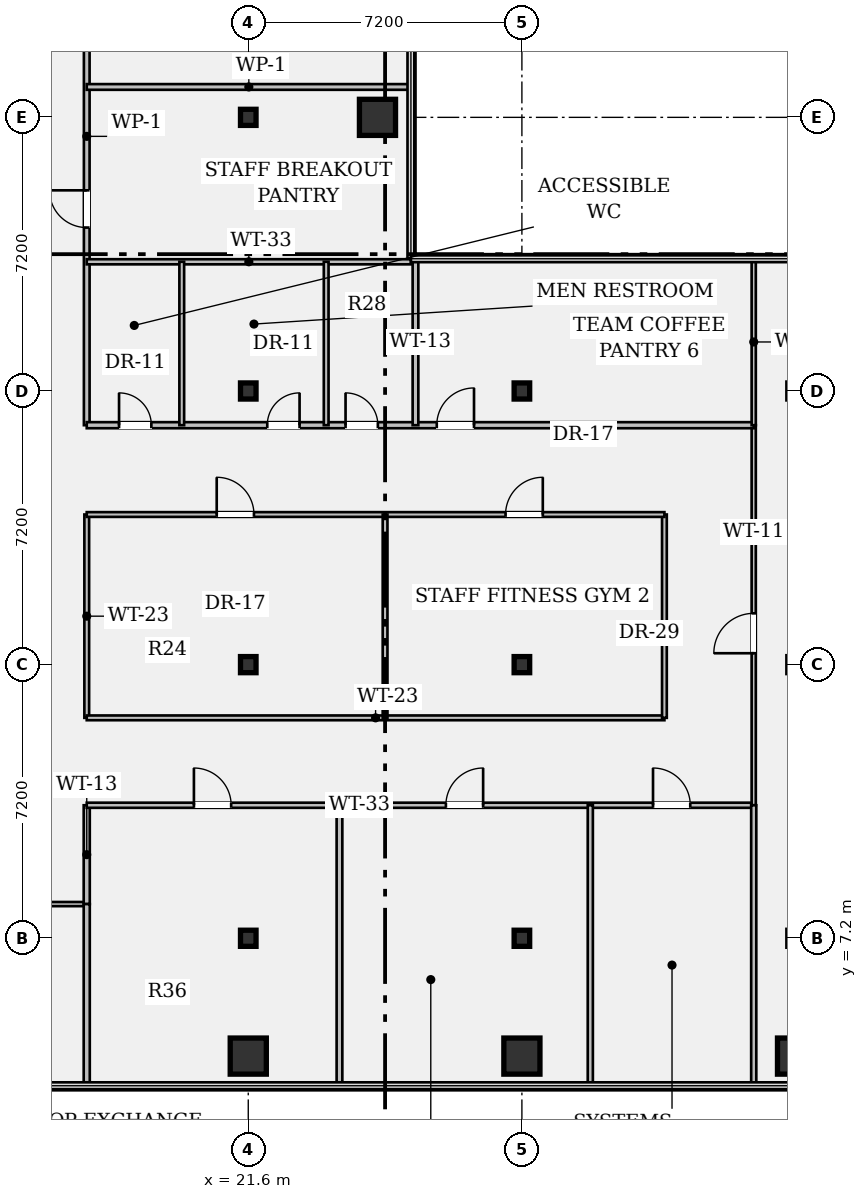
"""IFC4 building model, lengths in metres.
Left out: names, types, materials, properties, quantities, classifications, styles, units other than length and angle.
Written with IfcOpenShell. Run it as: python <this file> out.ifc"""

import sys

from ifc_helpers import new_model, si_unit, direction, frame, frame_2d, origin, origin_2d, place, context, subcontext, project, spatial, rectangle, hollow_rectangle, i_section, extrude, element, fill, save


model = new_model("IFC4")
c1 = context("Model", 3, precision=1e-05, world=origin(), true_north=direction((0.0, 1.0)))
c2 = subcontext(c1, "Body", "Model", "MODEL_VIEW")
j1 = project(units=[si_unit("LENGTHUNIT", "METRE"), si_unit("PLANEANGLEUNIT", "RADIAN")], contexts=[c1])
p1 = place(None, origin())
s1 = spatial("IfcSite", under=j1, at=p1, CompositionType="ELEMENT")
p2 = place(p1, origin())
s2 = spatial("IfcBuilding", under=s1, at=p2, CompositionType="ELEMENT")
p3 = place(p2, frame((0.0, 0.0, 113.75)))
s3 = spatial("IfcBuildingStorey", under=s2, at=p3, CompositionType="ELEMENT", Elevation=113.75)
p4 = place(p3, frame((21.6, 4.1, 0.0), z_axis=(0.0, 0.0, 1.0), x_axis=(1.0, 0.0, 0.0)))
e1 = element("IfcColumn", 1, at=p4, inside=s3, PredefinedType="COLUMN", context=c2, shape_type="SweptSolid", body=[
    extrude(hollow_rectangle(XDim=0.95, YDim=0.95, WallThickness=0.06, at=origin_2d()), origin(), (0.0, 0.0, 1.0), 3.58),
])
for number, where, z_axis, x_axis in (
    (2, (21.6, 7.2, 0.0), (0.0, 0.0, 1.0), (1.0, 0.0, 0.0)),
    (3, (21.6, 14.4, 0.0), (0.0, 0.0, 1.0), (1.0, 0.0, 0.0)),
    (4, (21.6, 21.6, 0.0), (0.0, 0.0, 1.0), (1.0, 0.0, 0.0)),
    (5, (21.6, 28.8, 0.0), (0.0, 0.0, 1.0), (1.0, 0.0, 0.0)),
):
    element("IfcColumn", number, at=place(p3, frame(where, z_axis=z_axis, x_axis=x_axis)), inside=s3, PredefinedType="COLUMN", context=c2, shape_type="SweptSolid", body=[
        extrude(i_section(OverallWidth=0.409, OverallDepth=0.424, WebThickness=0.033, FlangeThickness=0.052, FilletRadius=0.018, at=origin_2d()), origin(), (0.0, 0.0, 1.0), 3.58),
    ])
for number, where, z_axis, x_axis in (
    (6, (25.0, 28.8, 0.0), (0.0, 0.0, 1.0), (1.0, 0.0, 0.0)),
    (7, (28.8, 4.1, 0.0), (0.0, 0.0, 1.0), (1.0, 0.0, 0.0)),
):
    element("IfcColumn", number, at=place(p3, frame(where, z_axis=z_axis, x_axis=x_axis)), inside=s3, PredefinedType="COLUMN", context=c2, shape_type="SweptSolid", body=[
        extrude(hollow_rectangle(XDim=0.95, YDim=0.95, WallThickness=0.06, at=origin_2d()), origin(), (0.0, 0.0, 1.0), 3.58),
    ])
for number, where, z_axis, x_axis in (
    (8, (28.8, 7.2, 0.0), (0.0, 0.0, 1.0), (1.0, 0.0, 0.0)),
    (9, (28.8, 14.4, 0.0), (0.0, 0.0, 1.0), (1.0, 0.0, 0.0)),
    (10, (28.8, 21.6, 0.0), (0.0, 0.0, 1.0), (1.0, 0.0, 0.0)),
):
    element("IfcColumn", number, at=place(p3, frame(where, z_axis=z_axis, x_axis=x_axis)), inside=s3, PredefinedType="COLUMN", context=c2, shape_type="SweptSolid", body=[
        extrude(i_section(OverallWidth=0.409, OverallDepth=0.424, WebThickness=0.033, FlangeThickness=0.052, FilletRadius=0.018, at=origin_2d()), origin(), (0.0, 0.0, 1.0), 3.58),
    ])
p5 = place(p3, frame((36.0, 4.1, 0.0), z_axis=(0.0, 0.0, 1.0), x_axis=(1.0, 0.0, 0.0)))
e11 = element("IfcColumn", 11, at=p5, inside=s3, PredefinedType="COLUMN", context=c2, shape_type="SweptSolid", body=[
    extrude(hollow_rectangle(XDim=0.95, YDim=0.95, WallThickness=0.06, at=origin_2d()), origin(), (0.0, 0.0, 1.0), 3.58),
])
for number, where, z_axis, x_axis in (
    (12, (36.0, 7.2, 0.0), (0.0, 0.0, 1.0), (1.0, 0.0, 0.0)),
    (13, (36.0, 14.4, 0.0), (0.0, 0.0, 1.0), (1.0, 0.0, 0.0)),
    (14, (36.0, 21.6, 0.0), (0.0, 0.0, 1.0), (1.0, 0.0, 0.0)),
):
    element("IfcColumn", number, at=place(p3, frame(where, z_axis=z_axis, x_axis=x_axis)), inside=s3, PredefinedType="COLUMN", context=c2, shape_type="SweptSolid", body=[
        extrude(i_section(OverallWidth=0.409, OverallDepth=0.424, WebThickness=0.033, FlangeThickness=0.052, FilletRadius=0.018, at=origin_2d()), origin(), (0.0, 0.0, 1.0), 3.58),
    ])
p6 = place(p3, frame((14.4, 8.1, 0.0), z_axis=(0.0, 0.0, 1.0), x_axis=(1.0, 0.0, 0.0)))
e15 = element("IfcWall", 15, at=p6, inside=s3, PredefinedType="PARTITIONING", context=c2, shape_type="SweptSolid", body=[
    extrude(rectangle(XDim=2.95, YDim=0.11, at=frame_2d((1.475, 0.0))), origin(), (0.0, 0.0, 1.0), 3.098),
])
p7 = place(p6, frame((0.95, 0.0, 0.0)))
e16 = element("IfcOpeningElement", 16, at=p7, cuts=e15, PredefinedType="OPENING", context=c2, shape_type="SweptSolid", body=[
    extrude(rectangle(XDim=0.98, YDim=2.15, at=frame_2d((0.49, 1.075))), frame((0.0, 0.067, 0.0), z_axis=(0.0, -1.0, 0.0), x_axis=(1.0, 0.0, 0.0)), (0.0, 0.0, 1.0), 0.134),
])
p8 = place(p3, frame((17.35, 8.1, 0.0), z_axis=(0.0, 0.0, 1.0), x_axis=(0.0, 1.0, 0.0)))
e17 = element("IfcWall", 17, at=p8, inside=s3, PredefinedType="PARTITIONING", context=c2, shape_type="SweptSolid", body=[
    extrude(rectangle(XDim=2.6, YDim=0.16, at=frame_2d((1.3, 0.0))), origin(), (0.0, 0.0, 1.0), 3.58),
])
p9 = place(p3, frame((17.35, 20.7, 0.0), z_axis=(0.0, 0.0, 1.0), x_axis=(0.0, 1.0, 0.0)))
e18 = element("IfcWall", 18, at=p9, inside=s3, PredefinedType="PARTITIONING", context=c2, shape_type="SweptSolid", body=[
    extrude(rectangle(XDim=15.2, YDim=0.15, at=frame_2d((7.6, 0.0))), origin(), (0.0, 0.0, 1.0), 2.869),
])
p10 = place(p9, frame((5.2, 0.0, 0.0)))
e19 = element("IfcOpeningElement", 19, at=p10, cuts=e18, PredefinedType="OPENING", context=c2, shape_type="SweptSolid", body=[
    extrude(rectangle(XDim=0.98, YDim=2.15, at=frame_2d((0.49, 1.075))), frame((0.0, 0.087, 0.0), z_axis=(0.0, -1.0, 0.0), x_axis=(1.0, 0.0, 0.0)), (0.0, 0.0, 1.0), 0.174),
])
p11 = place(p9, frame((10.6, 0.0, 0.0)))
e20 = element("IfcOpeningElement", 20, at=p11, cuts=e18, PredefinedType="OPENING", context=c2, shape_type="SweptSolid", body=[
    extrude(rectangle(XDim=1.0, YDim=2.15, at=frame_2d((0.5, 1.075))), frame((0.0, 0.087, 0.0), z_axis=(0.0, -1.0, 0.0), x_axis=(1.0, 0.0, 0.0)), (0.0, 0.0, 1.0), 0.174),
])
p12 = place(p3, frame((17.35, 10.7, 0.0), z_axis=(0.0, 0.0, 1.0), x_axis=(1.0, 0.0, 0.0)))
e21 = element("IfcWall", 21, at=p12, inside=s3, PredefinedType="PARTITIONING", context=c2, shape_type="SweptSolid", body=[
    extrude(rectangle(XDim=17.55, YDim=0.135, at=frame_2d((8.775, 0.0))), origin(), (0.0, 0.0, 1.0), 2.869),
])
p13 = place(p12, frame((2.82, 0.0, 0.0)))
e22 = element("IfcOpeningElement", 22, at=p13, cuts=e21, PredefinedType="OPENING", context=c2, shape_type="SweptSolid", body=[
    extrude(rectangle(XDim=0.98, YDim=2.15, at=frame_2d((0.49, 1.075))), frame((0.0, 0.08, 0.0), z_axis=(0.0, -1.0, 0.0), x_axis=(1.0, 0.0, 0.0)), (0.0, 0.0, 1.0), 0.159),
])
p14 = place(p12, frame((9.45, 0.0, 0.0)))
e23 = element("IfcOpeningElement", 23, at=p14, cuts=e21, PredefinedType="OPENING", context=c2, shape_type="SweptSolid", body=[
    extrude(rectangle(XDim=0.98, YDim=2.15, at=frame_2d((0.49, 1.075))), frame((0.0, 0.08, 0.0), z_axis=(0.0, -1.0, 0.0), x_axis=(1.0, 0.0, 0.0)), (0.0, 0.0, 1.0), 0.159),
])
p15 = place(p12, frame((14.9, 0.0, 0.0)))
e24 = element("IfcOpeningElement", 24, at=p15, cuts=e21, PredefinedType="OPENING", context=c2, shape_type="SweptSolid", body=[
    extrude(rectangle(XDim=0.98, YDim=2.15, at=frame_2d((0.49, 1.075))), frame((0.0, 0.08, 0.0), z_axis=(0.0, -1.0, 0.0), x_axis=(1.0, 0.0, 0.0)), (0.0, 0.0, 1.0), 0.159),
])
p16 = place(p3, frame((34.9, 10.7, 0.0), z_axis=(0.0, 0.0, 1.0), x_axis=(0.0, 1.0, 0.0)))
e25 = element("IfcWall", 25, at=p16, inside=s3, PredefinedType="PARTITIONING", context=c2, shape_type="SweptSolid", body=[
    extrude(rectangle(XDim=10.0, YDim=0.11, at=frame_2d((5.0, 0.0))), origin(), (0.0, 0.0, 1.0), 2.869),
])
p17 = place(p16, frame((4.0, 0.0, 0.0)))
e26 = element("IfcOpeningElement", 26, at=p17, cuts=e25, PredefinedType="OPENING", context=c2, shape_type="SweptSolid", body=[
    extrude(rectangle(XDim=1.05, YDim=2.15, at=frame_2d((0.525, 1.075))), frame((0.0, 0.067, 0.0), z_axis=(0.0, -1.0, 0.0), x_axis=(1.0, 0.0, 0.0)), (0.0, 0.0, 1.0), 0.134),
])
p18 = place(p3, frame((17.35, 20.7, 0.0), z_axis=(0.0, 0.0, 1.0), x_axis=(1.0, 0.0, 0.0)))
e27 = element("IfcWall", 27, at=p18, inside=s3, PredefinedType="PARTITIONING", context=c2, shape_type="SweptSolid", body=[
    extrude(rectangle(XDim=17.55, YDim=0.16, at=frame_2d((8.775, 0.0))), origin(), (0.0, 0.0, 1.0), 2.869),
])
p19 = place(p18, frame((0.85, 0.0, 0.0)))
e28 = element("IfcOpeningElement", 28, at=p19, cuts=e27, PredefinedType="OPENING", context=c2, shape_type="SweptSolid", body=[
    extrude(rectangle(XDim=0.85, YDim=2.15, at=frame_2d((0.425, 1.075))), frame((0.0, 0.092, 0.0), z_axis=(0.0, -1.0, 0.0), x_axis=(1.0, 0.0, 0.0)), (0.0, 0.0, 1.0), 0.184),
])
p20 = place(p18, frame((4.75, 0.0, 0.0)))
e29 = element("IfcOpeningElement", 29, at=p20, cuts=e27, PredefinedType="OPENING", context=c2, shape_type="SweptSolid", body=[
    extrude(rectangle(XDim=0.85, YDim=2.15, at=frame_2d((0.425, 1.075))), frame((0.0, 0.092, 0.0), z_axis=(0.0, -1.0, 0.0), x_axis=(1.0, 0.0, 0.0)), (0.0, 0.0, 1.0), 0.184),
])
p21 = place(p18, frame((6.81, 0.0, 0.0)))
e30 = element("IfcOpeningElement", 30, at=p21, cuts=e27, PredefinedType="OPENING", context=c2, shape_type="SweptSolid", body=[
    extrude(rectangle(XDim=0.85, YDim=2.15, at=frame_2d((0.425, 1.075))), frame((0.0, 0.092, 0.0), z_axis=(0.0, -1.0, 0.0), x_axis=(1.0, 0.0, 0.0)), (0.0, 0.0, 1.0), 0.184),
])
p22 = place(p18, frame((9.21, 0.0, 0.0)))
e31 = element("IfcOpeningElement", 31, at=p22, cuts=e27, PredefinedType="OPENING", context=c2, shape_type="SweptSolid", body=[
    extrude(rectangle(XDim=0.98, YDim=2.15, at=frame_2d((0.49, 1.075))), frame((0.0, 0.092, 0.0), z_axis=(0.0, -1.0, 0.0), x_axis=(1.0, 0.0, 0.0)), (0.0, 0.0, 1.0), 0.184),
])
p23 = place(p3, frame((17.35, 13.0, 0.0), z_axis=(0.0, 0.0, 1.0), x_axis=(0.0, 1.0, 0.0)))
e32 = element("IfcWall", 32, at=p23, inside=s3, PredefinedType="PARTITIONING", context=c2, shape_type="SweptSolid", body=[
    extrude(rectangle(XDim=5.35, YDim=0.125, at=frame_2d((2.675, 0.0))), origin(), (0.0, 0.0, 1.0), 2.869),
])
p24 = place(p3, frame((17.35, 13.0, 0.0), z_axis=(0.0, 0.0, 1.0), x_axis=(1.0, 0.0, 0.0)))
e33 = element("IfcWall", 33, at=p24, inside=s3, PredefinedType="PARTITIONING", context=c2, shape_type="SweptSolid", body=[
    extrude(rectangle(XDim=15.2, YDim=0.125, at=frame_2d((7.6, 0.0))), origin(), (0.0, 0.0, 1.0), 2.869),
])
p25 = place(p3, frame((32.55, 13.0, 0.0), z_axis=(0.0, 0.0, 1.0), x_axis=(0.0, 1.0, 0.0)))
e34 = element("IfcWall", 34, at=p25, inside=s3, PredefinedType="PARTITIONING", context=c2, shape_type="SweptSolid", body=[
    extrude(rectangle(XDim=5.35, YDim=0.125, at=frame_2d((2.675, 0.0))), origin(), (0.0, 0.0, 1.0), 2.869),
])
p26 = place(p3, frame((17.35, 18.35, 0.0), z_axis=(0.0, 0.0, 1.0), x_axis=(1.0, 0.0, 0.0)))
e35 = element("IfcWall", 35, at=p26, inside=s3, PredefinedType="PARTITIONING", context=c2, shape_type="SweptSolid", body=[
    extrude(rectangle(XDim=15.2, YDim=0.125, at=frame_2d((7.6, 0.0))), origin(), (0.0, 0.0, 1.0), 2.869),
])
p27 = place(p26, frame((3.42, 0.0, 0.0)))
e36 = element("IfcOpeningElement", 36, at=p27, cuts=e35, PredefinedType="OPENING", context=c2, shape_type="SweptSolid", body=[
    extrude(rectangle(XDim=0.98, YDim=2.15, at=frame_2d((0.49, 1.075))), frame((0.0, 0.074, 0.0), z_axis=(0.0, -1.0, 0.0), x_axis=(1.0, 0.0, 0.0)), (0.0, 0.0, 1.0), 0.149),
])
p28 = place(p26, frame((11.02, 0.0, 0.0)))
e37 = element("IfcOpeningElement", 37, at=p28, cuts=e35, PredefinedType="OPENING", context=c2, shape_type="SweptSolid", body=[
    extrude(rectangle(XDim=0.98, YDim=2.15, at=frame_2d((0.49, 1.075))), frame((0.0, 0.074, 0.0), z_axis=(0.0, -1.0, 0.0), x_axis=(1.0, 0.0, 0.0)), (0.0, 0.0, 1.0), 0.149),
])
p29 = place(p3, frame((25.2, 13.0, 0.0), z_axis=(0.0, 0.0, 1.0), x_axis=(0.0, 1.0, 0.0)))
e38 = element("IfcWall", 38, at=p29, inside=s3, PredefinedType="PARTITIONING", context=c2, shape_type="SweptSolid", body=[
    extrude(rectangle(XDim=5.35, YDim=0.125, at=frame_2d((2.675, 0.0))), origin(), (0.0, 0.0, 1.0), 2.869),
])
p30 = place(p3, frame((17.35, 25.0, 0.0), z_axis=(0.0, 0.0, 1.0), x_axis=(1.0, 0.0, 0.0)))
e39 = element("IfcWall", 39, at=p30, inside=s3, PredefinedType="PARTITIONING", context=c2, shape_type="SweptSolid", body=[
    extrude(rectangle(XDim=8.53, YDim=0.135, at=frame_2d((4.265, 0.0))), origin(), (0.0, 0.0, 1.0), 2.869),
])
for number, where, z_axis, x_axis in (
    (40, (19.85, 20.7, 0.0), (0.0, 0.0, 1.0), (0.0, 1.0, 0.0)),
    (41, (23.65, 20.7, 0.0), (0.0, 0.0, 1.0), (0.0, 1.0, 0.0)),
):
    element("IfcWall", number, at=place(p3, frame(where, z_axis=z_axis, x_axis=x_axis)), inside=s3, PredefinedType="PARTITIONING", context=c2, shape_type="SweptSolid", body=[
        extrude(rectangle(XDim=4.3, YDim=0.125, at=frame_2d((2.15, 0.0))), origin(), (0.0, 0.0, 1.0), 2.869),
    ])
p31 = place(p3, frame((17.35, 29.6, 0.0), z_axis=(0.0, 0.0, 1.0), x_axis=(1.0, 0.0, 0.0)))
e42 = element("IfcWall", 42, at=p31, inside=s3, PredefinedType="PARTITIONING", context=c2, shape_type="SweptSolid", body=[
    extrude(rectangle(XDim=8.53, YDim=0.15, at=frame_2d((4.265, 0.0))), origin(), (0.0, 0.0, 1.0), 2.869),
])
p32 = place(p3, frame((26.0, 20.7, 0.0), z_axis=(0.0, 0.0, 1.0), x_axis=(0.0, 1.0, 0.0)))
e43 = element("IfcWall", 43, at=p32, inside=s3, PredefinedType="PARTITIONING", context=c2, shape_type="SweptSolid", body=[
    extrude(rectangle(XDim=4.38, YDim=0.15, at=frame_2d((2.19, 0.0))), origin(), (0.0, 0.0, 1.0), 2.869),
])
p33 = place(p3, frame((34.9, 3.32, 0.0), z_axis=(0.0, 0.0, 1.0), x_axis=(0.0, 1.0, 0.0)))
e44 = element("IfcWall", 44, at=p33, inside=s3, PredefinedType="PARTITIONING", context=c2, shape_type="SweptSolid", body=[
    extrude(rectangle(XDim=7.38, YDim=0.135, at=frame_2d((3.69, 0.0))), origin(), (0.0, 0.0, 1.0), 2.869),
])
p34 = place(p3, frame((34.9, 20.7, 0.0), z_axis=(0.0, 0.0, 1.0), x_axis=(0.0, 1.0, 0.0)))
e45 = element("IfcWall", 45, at=p34, inside=s3, PredefinedType="PARTITIONING", context=c2, shape_type="SweptSolid", body=[
    extrude(rectangle(XDim=4.38, YDim=0.11, at=frame_2d((2.19, 0.0))), origin(), (0.0, 0.0, 1.0), 2.869),
])
p35 = place(p3, frame((17.35, 3.32, 0.0), z_axis=(0.0, 0.0, 1.0), x_axis=(0.0, 1.0, 0.0)))
e46 = element("IfcWall", 46, at=p35, inside=s3, PredefinedType="PARTITIONING", context=c2, shape_type="SweptSolid", body=[
    extrude(rectangle(XDim=4.78, YDim=0.16, at=frame_2d((2.39, 0.0))), origin(), (0.0, 0.0, 1.0), 2.869),
])
p36 = place(p3, frame((24.0, 3.32, 0.0), z_axis=(0.0, 0.0, 1.0), x_axis=(0.0, 1.0, 0.0)))
e47 = element("IfcWall", 47, at=p36, inside=s3, PredefinedType="PARTITIONING", context=c2, shape_type="SweptSolid", body=[
    extrude(rectangle(XDim=7.38, YDim=0.15, at=frame_2d((3.69, 0.0))), origin(), (0.0, 0.0, 1.0), 2.869),
])
p37 = place(p3, frame((30.6, 3.32, 0.0), z_axis=(0.0, 0.0, 1.0), x_axis=(0.0, 1.0, 0.0)))
e48 = element("IfcWall", 48, at=p37, inside=s3, PredefinedType="PARTITIONING", context=c2, shape_type="SweptSolid", body=[
    extrude(rectangle(XDim=7.38, YDim=0.135, at=frame_2d((3.69, 0.0))), origin(), (0.0, 0.0, 1.0), 2.869),
])
p38 = place(p27, origin())
e49 = element("IfcDoor", 49, at=p38, inside=s3, OperationType="SINGLE_SWING_LEFT", PredefinedType="DOOR", context=c2, shape_type="SweptSolid", body=[
    extrude(rectangle(XDim=0.98, YDim=2.15, at=frame_2d((0.49, 1.075))), frame((0.0, 0.025, 0.0), z_axis=(0.0, -1.0, 0.0), x_axis=(1.0, 0.0, 0.0)), (0.0, 0.0, 1.0), 0.05),
])
fill(e36, e49)
p39 = place(p28, origin())
e50 = element("IfcDoor", 50, at=p39, inside=s3, OperationType="SINGLE_SWING_RIGHT", PredefinedType="DOOR", context=c2, shape_type="SweptSolid", body=[
    extrude(rectangle(XDim=0.98, YDim=2.15, at=frame_2d((0.49, 1.075))), frame((0.0, 0.025, 0.0), z_axis=(0.0, -1.0, 0.0), x_axis=(1.0, 0.0, 0.0)), (0.0, 0.0, 1.0), 0.05),
])
fill(e37, e50)
p40 = place(p19, origin())
e51 = element("IfcDoor", 51, at=p40, inside=s3, OperationType="SINGLE_SWING_LEFT", PredefinedType="DOOR", context=c2, shape_type="SweptSolid", body=[
    extrude(rectangle(XDim=0.85, YDim=2.15, at=frame_2d((0.425, 1.075))), frame((0.0, 0.025, 0.0), z_axis=(0.0, -1.0, 0.0), x_axis=(1.0, 0.0, 0.0)), (0.0, 0.0, 1.0), 0.05),
])
fill(e28, e51)
p41 = place(p20, origin())
e52 = element("IfcDoor", 52, at=p41, inside=s3, OperationType="SINGLE_SWING_RIGHT", PredefinedType="DOOR", context=c2, shape_type="SweptSolid", body=[
    extrude(rectangle(XDim=0.85, YDim=2.15, at=frame_2d((0.425, 1.075))), frame((0.0, 0.025, 0.0), z_axis=(0.0, -1.0, 0.0), x_axis=(1.0, 0.0, 0.0)), (0.0, 0.0, 1.0), 0.05),
])
fill(e29, e52)
p42 = place(p21, origin())
e53 = element("IfcDoor", 53, at=p42, inside=s3, OperationType="SINGLE_SWING_LEFT", PredefinedType="DOOR", context=c2, shape_type="SweptSolid", body=[
    extrude(rectangle(XDim=0.85, YDim=2.15, at=frame_2d((0.425, 1.075))), frame((0.0, 0.025, 0.0), z_axis=(0.0, -1.0, 0.0), x_axis=(1.0, 0.0, 0.0)), (0.0, 0.0, 1.0), 0.05),
])
fill(e30, e53)
p43 = place(p10, origin())
e54 = element("IfcDoor", 54, at=p43, inside=s3, OperationType="SINGLE_SWING_RIGHT", PredefinedType="DOOR", context=c2, shape_type="SweptSolid", body=[
    extrude(rectangle(XDim=0.98, YDim=2.15, at=frame_2d((0.49, 1.075))), frame((0.0, 0.025, 0.0), z_axis=(0.0, -1.0, 0.0), x_axis=(1.0, 0.0, 0.0)), (0.0, 0.0, 1.0), 0.05),
])
fill(e19, e54)
p44 = place(p22, origin())
e55 = element("IfcDoor", 55, at=p44, inside=s3, OperationType="SINGLE_SWING_RIGHT", PredefinedType="DOOR", context=c2, shape_type="SweptSolid", body=[
    extrude(rectangle(XDim=0.98, YDim=2.15, at=frame_2d((0.49, 1.075))), frame((0.0, 0.025, 0.0), z_axis=(0.0, -1.0, 0.0), x_axis=(1.0, 0.0, 0.0)), (0.0, 0.0, 1.0), 0.05),
])
fill(e31, e55)
p45 = place(p17, origin())
e56 = element("IfcDoor", 56, at=p45, inside=s3, OperationType="SINGLE_SWING_LEFT", PredefinedType="DOOR", context=c2, shape_type="SweptSolid", body=[
    extrude(rectangle(XDim=1.05, YDim=2.15, at=frame_2d((0.525, 1.075))), frame((0.0, 0.025, 0.0), z_axis=(0.0, -1.0, 0.0), x_axis=(1.0, 0.0, 0.0)), (0.0, 0.0, 1.0), 0.05),
])
fill(e26, e56)
p46 = place(p13, origin())
e57 = element("IfcDoor", 57, at=p46, inside=s3, OperationType="SINGLE_SWING_LEFT", PredefinedType="DOOR", context=c2, shape_type="SweptSolid", body=[
    extrude(rectangle(XDim=0.98, YDim=2.15, at=frame_2d((0.49, 1.075))), frame((0.0, 0.025, 0.0), z_axis=(0.0, -1.0, 0.0), x_axis=(1.0, 0.0, 0.0)), (0.0, 0.0, 1.0), 0.05),
])
fill(e22, e57)
p47 = place(p14, origin())
e58 = element("IfcDoor", 58, at=p47, inside=s3, OperationType="SINGLE_SWING_RIGHT", PredefinedType="DOOR", context=c2, shape_type="SweptSolid", body=[
    extrude(rectangle(XDim=0.98, YDim=2.15, at=frame_2d((0.49, 1.075))), frame((0.0, 0.025, 0.0), z_axis=(0.0, -1.0, 0.0), x_axis=(1.0, 0.0, 0.0)), (0.0, 0.0, 1.0), 0.05),
])
fill(e23, e58)
p48 = place(p15, origin())
e59 = element("IfcDoor", 59, at=p48, inside=s3, OperationType="SINGLE_SWING_LEFT", PredefinedType="DOOR", context=c2, shape_type="SweptSolid", body=[
    extrude(rectangle(XDim=0.98, YDim=2.15, at=frame_2d((0.49, 1.075))), frame((0.0, 0.025, 0.0), z_axis=(0.0, -1.0, 0.0), x_axis=(1.0, 0.0, 0.0)), (0.0, 0.0, 1.0), 0.05),
])
fill(e24, e59)
save(model, sys.argv[1])
